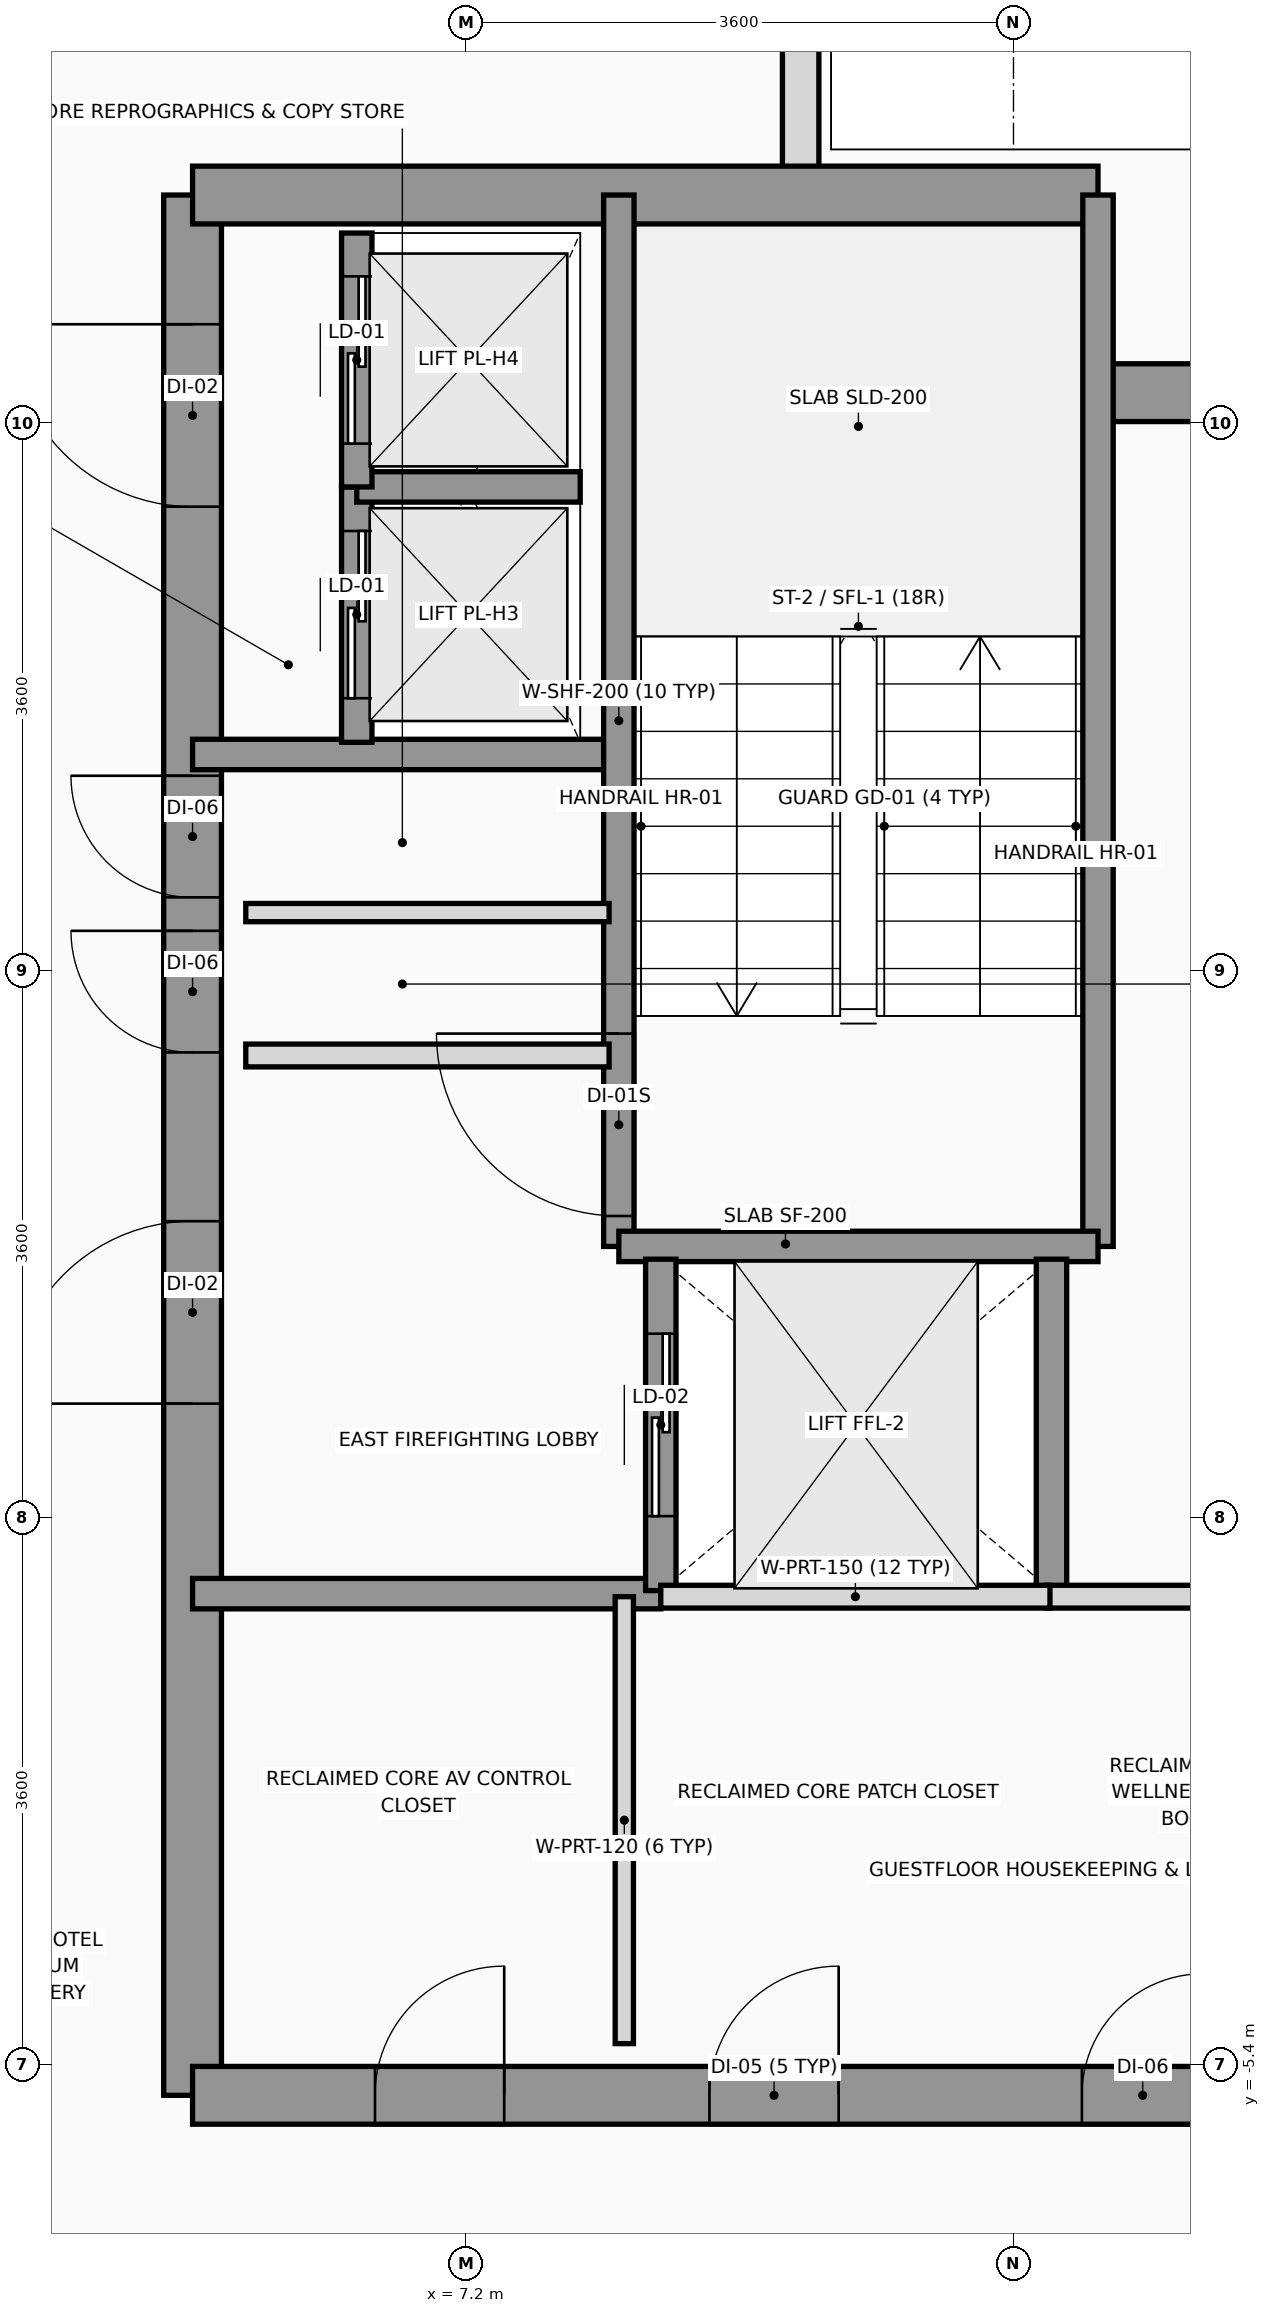
"""IFC4 building model, lengths in metres.
Left out: names, types, materials, properties, quantities, classifications, styles, units other than length and angle.
Written with IfcOpenShell. Run it as: python <this file> out.ifc"""

import sys

from ifc_helpers import new_model, si_unit, direction, frame, frame_2d, origin, place, context, subcontext, project, spatial, rectangle, extrude, source, transform, mapped, element, fill, save


model = new_model("IFC4")
c1 = context("Model", 3, precision=1e-05, world=origin(), true_north=direction((0.0, 1.0)))
c2 = subcontext(c1, "Body", "Model", "MODEL_VIEW")
j1 = project(units=[si_unit("LENGTHUNIT", "METRE"), si_unit("PLANEANGLEUNIT", "RADIAN")], contexts=[c1])
p1 = place(None, origin())
s1 = spatial("IfcSite", under=j1, at=p1, CompositionType="ELEMENT")
p2 = place(p1, origin())
s2 = spatial("IfcBuilding", under=s1, at=p2, CompositionType="ELEMENT")
p3 = place(p2, frame((0.0, 0.0, 184.2)))
s3 = spatial("IfcBuildingStorey", under=s2, at=p3, CompositionType="ELEMENT", Elevation=184.2)
p4 = place(p3, frame((9.4, 8.547, 0.0), z_axis=(0.0, 0.0, 1.0), x_axis=(0.0, -1.0, 0.0)))
e1 = element("IfcWall", 1, at=p4, inside=s3, PredefinedType="PARAPET", context=c2, shape_type="SweptSolid", body=[
    extrude(rectangle(XDim=1.594, YDim=0.24, at=frame_2d((0.797, 0.0))), origin(), (0.0, 0.0, 1.0), 1.15),
])
p5 = place(p3, frame((5.4, -5.6, 0.0), z_axis=(0.0, 0.0, 1.0), x_axis=(0.0, 1.0, 0.0)))
e2 = element("IfcWall", 2, at=p5, inside=s3, PredefinedType="SHEAR", context=c2, shape_type="SweptSolid", body=[
    extrude(rectangle(XDim=12.5, YDim=0.38, at=frame_2d((6.25, 0.0))), origin(), (0.0, 0.0, 1.0), 3.2),
])
p6 = place(p5, frame((4.55, 0.0, 0.0)))
e3 = element("IfcOpeningElement", 3, at=p6, cuts=e2, PredefinedType="OPENING", context=c2, shape_type="SweptSolid", body=[
    extrude(rectangle(XDim=1.2, YDim=2.2, at=frame_2d((0.6, 1.1))), frame((0.0, 0.2, 0.0), z_axis=(0.0, -1.0, 0.0), x_axis=(1.0, 0.0, 0.0)), (0.0, 0.0, 1.0), 0.4),
])
p7 = place(p5, frame((10.45, 0.0, 0.0)))
e4 = element("IfcOpeningElement", 4, at=p7, cuts=e2, PredefinedType="OPENING", context=c2, shape_type="SweptSolid", body=[
    extrude(rectangle(XDim=1.2, YDim=2.2, at=frame_2d((0.6, 1.1))), frame((0.0, 0.2, 0.0), z_axis=(0.0, -1.0, 0.0), x_axis=(1.0, 0.0, 0.0)), (0.0, 0.0, 1.0), 0.4),
])
p8 = place(p5, frame((6.86, 0.0, 0.0)))
e5 = element("IfcOpeningElement", 5, at=p8, cuts=e2, PredefinedType="OPENING", context=c2, shape_type="SweptSolid", body=[
    extrude(rectangle(XDim=0.8, YDim=2.1, at=frame_2d((0.4, 1.05))), frame((0.0, 0.2, 0.0), z_axis=(0.0, -1.0, 0.0), x_axis=(1.0, 0.0, 0.0)), (0.0, 0.0, 1.0), 0.4),
])
p9 = place(p5, frame((7.88, 0.0, 0.0)))
e6 = element("IfcOpeningElement", 6, at=p9, cuts=e2, PredefinedType="OPENING", context=c2, shape_type="SweptSolid", body=[
    extrude(rectangle(XDim=0.8, YDim=2.1, at=frame_2d((0.4, 1.05))), frame((0.0, 0.2, 0.0), z_axis=(0.0, -1.0, 0.0), x_axis=(1.0, 0.0, 0.0)), (0.0, 0.0, 1.0), 0.4),
])
p10 = place(p3, frame((5.4, 6.9, 0.0), z_axis=(0.0, 0.0, 1.0), x_axis=(1.0, 0.0, 0.0)))
e7 = element("IfcWall", 7, at=p10, inside=s3, PredefinedType="SHEAR", context=c2, shape_type="SweptSolid", body=[
    extrude(rectangle(XDim=5.956, YDim=0.38, at=frame_2d((2.978, 0.0))), origin(), (0.0, 0.0, 1.0), 3.2),
])
p11 = place(p3, frame((11.356, 5.6, 0.0), z_axis=(0.0, 0.0, 1.0), x_axis=(1.0, 0.0, 0.0)))
e8 = element("IfcWall", 8, at=p11, inside=s3, PredefinedType="SHEAR", context=c2, shape_type="SweptSolid", body=[
    extrude(rectangle(XDim=1.844, YDim=0.38, at=frame_2d((0.922, 0.0))), origin(), (0.0, 0.0, 1.0), 3.2),
])
p12 = place(p3, frame((5.4, -5.6, 0.0), z_axis=(0.0, 0.0, 1.0), x_axis=(1.0, 0.0, 0.0)))
e9 = element("IfcWall", 9, at=p12, inside=s3, PredefinedType="SHEAR", context=c2, shape_type="SweptSolid", body=[
    extrude(rectangle(XDim=7.8, YDim=0.38, at=frame_2d((3.9, 0.0))), origin(), (0.0, 0.0, 1.0), 3.2),
])
p13 = place(p12, frame((5.85, 0.0, 0.0)))
e10 = element("IfcOpeningElement", 10, at=p13, cuts=e9, PredefinedType="OPENING", context=c2, shape_type="SweptSolid", body=[
    extrude(rectangle(XDim=0.8, YDim=2.1, at=frame_2d((0.4, 1.05))), frame((0.0, 0.2, 0.0), z_axis=(0.0, -1.0, 0.0), x_axis=(1.0, 0.0, 0.0)), (0.0, 0.0, 1.0), 0.4),
])
p14 = place(p12, frame((1.2, 0.0, 0.0)))
e11 = element("IfcOpeningElement", 11, at=p14, cuts=e9, PredefinedType="OPENING", context=c2, shape_type="SweptSolid", body=[
    extrude(rectangle(XDim=0.85, YDim=2.1, at=frame_2d((0.425, 1.05))), frame((0.0, 0.2, 0.0), z_axis=(0.0, -1.0, 0.0), x_axis=(1.0, 0.0, 0.0)), (0.0, 0.0, 1.0), 0.4),
])
p15 = place(p12, frame((3.4, 0.0, 0.0)))
e12 = element("IfcOpeningElement", 12, at=p15, cuts=e9, PredefinedType="OPENING", context=c2, shape_type="SweptSolid", body=[
    extrude(rectangle(XDim=0.85, YDim=2.1, at=frame_2d((0.425, 1.05))), frame((0.0, 0.2, 0.0), z_axis=(0.0, -1.0, 0.0), x_axis=(1.0, 0.0, 0.0)), (0.0, 0.0, 1.0), 0.4),
])
p16 = place(p3, frame((5.4, 3.22, 0.0), z_axis=(0.0, 0.0, 1.0), x_axis=(1.0, 0.0, 0.0)))
e13 = element("IfcWall", 13, at=p16, inside=s3, PredefinedType="SOLIDWALL", context=c2, shape_type="SweptSolid", body=[
    extrude(rectangle(XDim=2.78, YDim=0.2, at=frame_2d((1.39, 0.0))), origin(), (0.0, 0.0, 1.0), 3.2),
])
p17 = place(p3, frame((5.4, -2.3, 0.0), z_axis=(0.0, 0.0, 1.0), x_axis=(1.0, 0.0, 0.0)))
e14 = element("IfcWall", 14, at=p17, inside=s3, PredefinedType="SOLIDWALL", context=c2, shape_type="SweptSolid", body=[
    extrude(rectangle(XDim=3.08, YDim=0.2, at=frame_2d((1.54, 0.0))), origin(), (0.0, 0.0, 1.0), 3.2),
])
p18 = place(p3, frame((8.204, -0.016, 0.0), z_axis=(0.0, 0.0, 1.0), x_axis=(0.0, 1.0, 0.0)))
e15 = element("IfcWall", 15, at=p18, inside=s3, PredefinedType="SOLIDWALL", context=c2, shape_type="SweptSolid", body=[
    extrude(rectangle(XDim=6.916, YDim=0.2, at=frame_2d((3.458, 0.0))), origin(), (0.0, 0.0, 1.0), 3.2),
])
p19 = place(p18, frame((0.2, 0.0, 0.0)))
e16 = element("IfcOpeningElement", 16, at=p19, cuts=e15, PredefinedType="OPENING", context=c2, shape_type="SweptSolid", body=[
    extrude(rectangle(XDim=1.2, YDim=2.2, at=frame_2d((0.6, 1.1))), frame((0.0, 0.11, 0.0), z_axis=(0.0, -1.0, 0.0), x_axis=(1.0, 0.0, 0.0)), (0.0, 0.0, 1.0), 0.22),
])
p20 = place(p3, frame((11.356, -0.016, 0.0), z_axis=(0.0, 0.0, 1.0), x_axis=(0.0, 1.0, 0.0)))
e17 = element("IfcWall", 17, at=p20, inside=s3, PredefinedType="SOLIDWALL", context=c2, shape_type="SweptSolid", body=[
    extrude(rectangle(XDim=6.916, YDim=0.2, at=frame_2d((3.458, 0.0))), origin(), (0.0, 0.0, 1.0), 3.2),
])
p21 = place(p3, frame((8.204, -0.016, 0.0), z_axis=(0.0, 0.0, 1.0), x_axis=(1.0, 0.0, 0.0)))
e18 = element("IfcWall", 18, at=p21, inside=s3, PredefinedType="SOLIDWALL", context=c2, shape_type="SweptSolid", body=[
    extrude(rectangle(XDim=3.152, YDim=0.2, at=frame_2d((1.576, 0.0))), origin(), (0.0, 0.0, 1.0), 3.2),
])
p22 = place(p3, frame((8.48, -2.28, 0.0), z_axis=(0.0, 0.0, 1.0), x_axis=(0.0, 1.0, 0.0)))
e19 = element("IfcWall", 19, at=p22, inside=s3, PredefinedType="SOLIDWALL", context=c2, shape_type="SweptSolid", body=[
    extrude(rectangle(XDim=2.18, YDim=0.2, at=frame_2d((1.09, 0.0))), origin(), (0.0, 0.0, 1.0), 3.2),
])
p23 = place(p22, frame((0.49, 0.0, 0.0)))
e20 = element("IfcOpeningElement", 20, at=p23, cuts=e19, PredefinedType="OPENING", context=c2, shape_type="SweptSolid", body=[
    extrude(rectangle(XDim=1.2, YDim=2.2, at=frame_2d((0.6, 1.1))), frame((0.0, 0.11, 0.0), z_axis=(0.0, -1.0, 0.0), x_axis=(1.0, 0.0, 0.0)), (0.0, 0.0, 1.0), 0.22),
])
p24 = place(p3, frame((11.05, -2.28, 0.0), z_axis=(0.0, 0.0, 1.0), x_axis=(0.0, 1.0, 0.0)))
e21 = element("IfcWall", 21, at=p24, inside=s3, PredefinedType="SOLIDWALL", context=c2, shape_type="SweptSolid", body=[
    extrude(rectangle(XDim=2.18, YDim=0.2, at=frame_2d((1.09, 0.0))), origin(), (0.0, 0.0, 1.0), 3.2),
])
p25 = place(p3, frame((6.48, 3.3, 0.0), z_axis=(0.0, 0.0, 1.0), x_axis=(0.0, 1.0, 0.0)))
e22 = element("IfcWall", 22, at=p25, inside=s3, PredefinedType="SOLIDWALL", context=c2, shape_type="SweptSolid", body=[
    extrude(rectangle(XDim=1.68, YDim=0.2, at=frame_2d((0.84, 0.0))), origin(), (0.0, 0.0, 1.0), 3.2),
])
p26 = place(p25, frame((0.29, 0.0, 0.0)))
e23 = element("IfcOpeningElement", 23, at=p26, cuts=e22, PredefinedType="OPENING", context=c2, shape_type="SweptSolid", body=[
    extrude(rectangle(XDim=1.1, YDim=2.2, at=frame_2d((0.55, 1.1))), frame((0.0, 0.11, 0.0), z_axis=(0.0, -1.0, 0.0), x_axis=(1.0, 0.0, 0.0)), (0.0, 0.0, 1.0), 0.22),
])
p27 = place(p3, frame((6.48, 4.98, 0.0), z_axis=(0.0, 0.0, 1.0), x_axis=(1.0, 0.0, 0.0)))
e24 = element("IfcWall", 24, at=p27, inside=s3, PredefinedType="SOLIDWALL", context=c2, shape_type="SweptSolid", body=[
    extrude(rectangle(XDim=1.47, YDim=0.2, at=frame_2d((0.735, 0.0))), origin(), (0.0, 0.0, 1.0), 3.2),
])
p28 = place(p3, frame((6.48, 4.98, 0.0), z_axis=(0.0, 0.0, 1.0), x_axis=(0.0, 1.0, 0.0)))
e25 = element("IfcWall", 25, at=p28, inside=s3, PredefinedType="SOLIDWALL", context=c2, shape_type="SweptSolid", body=[
    extrude(rectangle(XDim=1.67, YDim=0.2, at=frame_2d((0.835, 0.0))), origin(), (0.0, 0.0, 1.0), 3.2),
])
p29 = place(p28, frame((0.285, 0.0, 0.0)))
e26 = element("IfcOpeningElement", 26, at=p29, cuts=e25, PredefinedType="OPENING", context=c2, shape_type="SweptSolid", body=[
    extrude(rectangle(XDim=1.1, YDim=2.2, at=frame_2d((0.55, 1.1))), frame((0.0, 0.11, 0.0), z_axis=(0.0, -1.0, 0.0), x_axis=(1.0, 0.0, 0.0)), (0.0, 0.0, 1.0), 0.22),
])
p30 = place(p3, frame((5.75, 1.24, 0.0), z_axis=(0.0, 0.0, 1.0), x_axis=(1.0, 0.0, 0.0)))
e27 = element("IfcWall", 27, at=p30, inside=s3, PredefinedType="PARTITIONING", context=c2, shape_type="SweptSolid", body=[
    extrude(rectangle(XDim=2.39, YDim=0.15, at=frame_2d((1.195, 0.0))), origin(), (0.0, 0.0, 1.0), 2.3),
])
p31 = place(p3, frame((5.75, 2.18, 0.0), z_axis=(0.0, 0.0, 1.0), x_axis=(1.0, 0.0, 0.0)))
e28 = element("IfcWall", 28, at=p31, inside=s3, PredefinedType="PARTITIONING", context=c2, shape_type="SweptSolid", body=[
    extrude(rectangle(XDim=2.39, YDim=0.12, at=frame_2d((1.195, 0.0))), origin(), (0.0, 0.0, 1.0), 2.3),
])
p32 = place(p3, frame((11.02, -2.32, 0.0), z_axis=(0.0, 0.0, 1.0), x_axis=(1.0, 0.0, 0.0)))
e29 = element("IfcWall", 29, at=p32, inside=s3, PredefinedType="PARTITIONING", context=c2, shape_type="SweptSolid", body=[
    extrude(rectangle(XDim=2.18, YDim=0.15, at=frame_2d((1.09, 0.0))), origin(), (0.0, 0.0, 1.0), 3.2),
])
p33 = place(p3, frame((8.24, -5.26, 0.0), z_axis=(0.0, 0.0, 1.0), x_axis=(0.0, 1.0, 0.0)))
e30 = element("IfcWall", 30, at=p33, inside=s3, PredefinedType="PARTITIONING", context=c2, shape_type="SweptSolid", body=[
    extrude(rectangle(XDim=2.94, YDim=0.12, at=frame_2d((1.47, 0.0))), origin(), (0.0, 0.0, 1.0), 3.2),
])
p34 = place(p3, frame((8.48, -2.32, 0.0), z_axis=(0.0, 0.0, 1.0), x_axis=(1.0, 0.0, 0.0)))
e31 = element("IfcWall", 31, at=p34, inside=s3, PredefinedType="PARTITIONING", context=c2, shape_type="SweptSolid", body=[
    extrude(rectangle(XDim=2.56, YDim=0.15, at=frame_2d((1.28, 0.0))), origin(), (0.0, 0.0, 1.0), 3.2),
])
m1 = source(origin(), c2, "Body", "SweptSolid", [
    extrude(rectangle(XDim=1.2, YDim=2.2, at=frame_2d((0.6, 1.1))), frame((0.0, 0.025, 0.0), z_axis=(0.0, -1.0, 0.0), x_axis=(1.0, 0.0, 0.0)), (0.0, 0.0, 1.0), 0.05),
])
p35 = place(p19, origin())
e32 = element("IfcDoor", 32, at=p35, inside=s3, OperationType="SINGLE_SWING_RIGHT", PredefinedType="DOOR", context=c2, shape_type="MappedRepresentation", body=[
    mapped(m1, transform((0.0, 0.0, 0.0), x_axis=(1.0, 0.0, 0.0), y_axis=(0.0, 1.0, 0.0), z_axis=(0.0, 0.0, 1.0), scale=1.0)),
])
fill(e16, e32)
p36 = place(p6, origin())
e33 = element("IfcDoor", 33, at=p36, inside=s3, OperationType="SINGLE_SWING_LEFT", PredefinedType="DOOR", context=c2, shape_type="MappedRepresentation", body=[
    mapped(m1, transform((0.0, 0.0, 0.0), x_axis=(1.0, 0.0, 0.0), y_axis=(0.0, 1.0, 0.0), z_axis=(0.0, 0.0, 1.0), scale=1.0)),
])
fill(e3, e33)
p37 = place(p7, origin())
e34 = element("IfcDoor", 34, at=p37, inside=s3, OperationType="SINGLE_SWING_RIGHT", PredefinedType="DOOR", context=c2, shape_type="MappedRepresentation", body=[
    mapped(m1, transform((0.0, 0.0, 0.0), x_axis=(1.0, 0.0, 0.0), y_axis=(0.0, 1.0, 0.0), z_axis=(0.0, 0.0, 1.0), scale=1.0)),
])
fill(e4, e34)
m2 = source(origin(), c2, "Body", "SweptSolid", [
    extrude(rectangle(XDim=0.8, YDim=2.1, at=frame_2d((0.4, 1.05))), frame((0.0, 0.025, 0.0), z_axis=(0.0, -1.0, 0.0), x_axis=(1.0, 0.0, 0.0)), (0.0, 0.0, 1.0), 0.05),
])
p38 = place(p8, origin())
e35 = element("IfcDoor", 35, at=p38, inside=s3, OperationType="SINGLE_SWING_RIGHT", PredefinedType="DOOR", context=c2, shape_type="MappedRepresentation", body=[
    mapped(m2, transform((0.0, 0.0, 0.0), x_axis=(1.0, 0.0, 0.0), y_axis=(0.0, 1.0, 0.0), z_axis=(0.0, 0.0, 1.0), scale=1.0)),
])
fill(e5, e35)
p39 = place(p9, origin())
e36 = element("IfcDoor", 36, at=p39, inside=s3, OperationType="SINGLE_SWING_RIGHT", PredefinedType="DOOR", context=c2, shape_type="MappedRepresentation", body=[
    mapped(m2, transform((0.0, 0.0, 0.0), x_axis=(1.0, 0.0, 0.0), y_axis=(0.0, 1.0, 0.0), z_axis=(0.0, 0.0, 1.0), scale=1.0)),
])
fill(e6, e36)
p40 = place(p13, origin())
e37 = element("IfcDoor", 37, at=p40, inside=s3, OperationType="SINGLE_SWING_RIGHT", PredefinedType="DOOR", context=c2, shape_type="MappedRepresentation", body=[
    mapped(m2, transform((0.0, 0.0, 0.0), x_axis=(1.0, 0.0, 0.0), y_axis=(0.0, 1.0, 0.0), z_axis=(0.0, 0.0, 1.0), scale=1.0)),
])
fill(e10, e37)
m3 = source(origin(), c2, "Body", "SweptSolid", [
    extrude(rectangle(XDim=0.85, YDim=2.1, at=frame_2d((0.425, 1.05))), frame((0.0, 0.025, 0.0), z_axis=(0.0, -1.0, 0.0), x_axis=(1.0, 0.0, 0.0)), (0.0, 0.0, 1.0), 0.05),
])
p41 = place(p14, origin())
e38 = element("IfcDoor", 38, at=p41, inside=s3, OperationType="SINGLE_SWING_RIGHT", PredefinedType="DOOR", context=c2, shape_type="MappedRepresentation", body=[
    mapped(m3, transform((0.0, 0.0, 0.0), x_axis=(1.0, 0.0, 0.0), y_axis=(0.0, 1.0, 0.0), z_axis=(0.0, 0.0, 1.0), scale=1.0)),
])
fill(e11, e38)
p42 = place(p15, origin())
e39 = element("IfcDoor", 39, at=p42, inside=s3, OperationType="SINGLE_SWING_RIGHT", PredefinedType="DOOR", context=c2, shape_type="MappedRepresentation", body=[
    mapped(m3, transform((0.0, 0.0, 0.0), x_axis=(1.0, 0.0, 0.0), y_axis=(0.0, 1.0, 0.0), z_axis=(0.0, 0.0, 1.0), scale=1.0)),
])
fill(e12, e39)
p43 = place(p23, origin())
e40 = element("IfcDoor", 40, at=p43, inside=s3, OperationType="SLIDING_TO_RIGHT", PredefinedType="DOOR", context=c2, shape_type="MappedRepresentation", body=[
    mapped(m1, transform((0.0, 0.0, 0.0), x_axis=(1.0, 0.0, 0.0), y_axis=(0.0, 1.0, 0.0), z_axis=(0.0, 0.0, 1.0), scale=1.0)),
])
fill(e20, e40)
m4 = source(origin(), c2, "Body", "SweptSolid", [
    extrude(rectangle(XDim=1.1, YDim=2.2, at=frame_2d((0.55, 1.1))), frame((0.0, 0.025, 0.0), z_axis=(0.0, -1.0, 0.0), x_axis=(1.0, 0.0, 0.0)), (0.0, 0.0, 1.0), 0.05),
])
p44 = place(p26, origin())
e41 = element("IfcDoor", 41, at=p44, inside=s3, OperationType="SLIDING_TO_LEFT", PredefinedType="DOOR", context=c2, shape_type="MappedRepresentation", body=[
    mapped(m4, transform((0.0, 0.0, 0.0), x_axis=(1.0, 0.0, 0.0), y_axis=(0.0, 1.0, 0.0), z_axis=(0.0, 0.0, 1.0), scale=1.0)),
])
fill(e23, e41)
p45 = place(p29, origin())
e42 = element("IfcDoor", 42, at=p45, inside=s3, OperationType="SLIDING_TO_LEFT", PredefinedType="DOOR", context=c2, shape_type="MappedRepresentation", body=[
    mapped(m4, transform((0.0, 0.0, 0.0), x_axis=(1.0, 0.0, 0.0), y_axis=(0.0, 1.0, 0.0), z_axis=(0.0, 0.0, 1.0), scale=1.0)),
])
fill(e26, e42)
save(model, sys.argv[1])
